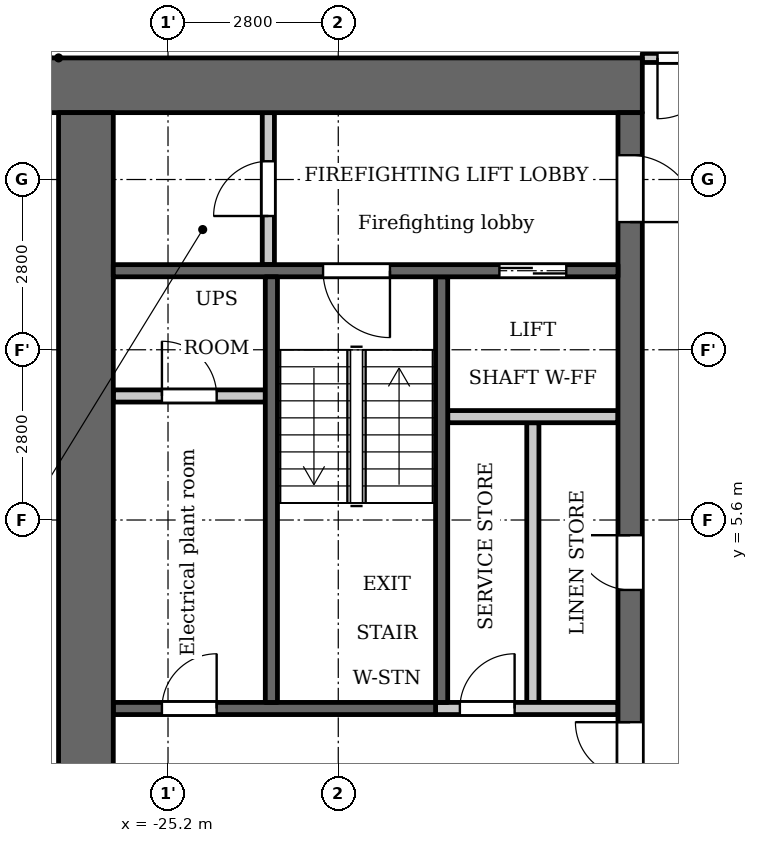
"""IFC4 building model, lengths in metres.
Left out: names, types, materials, properties, quantities, classifications, styles, units other than length and angle.
Written with IfcOpenShell. Run it as: python <this file> out.ifc"""

import sys

from ifc_helpers import new_model, si_unit, direction, frame, frame_2d, origin, place, context, subcontext, project, spatial, rectangle, extrude, element, fill, save


model = new_model("IFC4")
c1 = context("Model", 3, precision=1e-05, world=origin(), true_north=direction((0.0, 1.0)))
c2 = subcontext(c1, "Body", "Model", "MODEL_VIEW")
j1 = project(units=[si_unit("LENGTHUNIT", "METRE"), si_unit("PLANEANGLEUNIT", "RADIAN")], contexts=[c1])
p1 = place(None, origin())
s1 = spatial("IfcSite", under=j1, at=p1, CompositionType="ELEMENT")
p2 = place(p1, origin())
s2 = spatial("IfcBuilding", under=s1, at=p2, CompositionType="ELEMENT")
p3 = place(p2, frame((0.0, 0.0, 104.3)))
s3 = spatial("IfcBuildingStorey", under=s2, at=p3, CompositionType="ELEMENT", Elevation=104.3)
p4 = place(p3, frame((-20.7, 2.6, 0.0), z_axis=(0.0, 0.0, 1.0), x_axis=(0.0, 1.0, 0.0)))
e1 = element("IfcWall", 1, at=p4, inside=s3, PredefinedType="SHEAR", context=c2, shape_type="SweptSolid", body=[
    extrude(rectangle(XDim=7.0, YDim=0.2, at=frame_2d((3.5, 0.0))), origin(), (0.0, 0.0, 1.0), 3.2),
])
p5 = place(p3, frame((-20.8, 2.5, 0.0), z_axis=(0.0, 0.0, 1.0), x_axis=(-1.0, 0.0, 0.0)))
e2 = element("IfcWall", 2, at=p5, inside=s3, PredefinedType="SHEAR", context=c2, shape_type="SweptSolid", body=[
    extrude(rectangle(XDim=5.3, YDim=0.2, at=frame_2d((2.65, 0.0))), origin(), (0.0, 0.0, 1.0), 3.2),
])
p6 = place(p5, frame((3.6, 0.0, 0.0)))
e3 = element("IfcOpeningElement", 3, at=p6, cuts=e2, PredefinedType="OPENING", context=c2, shape_type="SweptSolid", body=[
    extrude(rectangle(XDim=0.9, YDim=2.1, at=frame_2d((0.45, 1.05))), frame((0.0, 0.11, 0.0), z_axis=(0.0, -1.0, 0.0), x_axis=(1.0, 0.0, 0.0)), (0.0, 0.0, 1.0), 0.22),
])
p7 = place(p3, frame((-17.4, 12.75, 0.0), z_axis=(0.0, 0.0, 1.0), x_axis=(-1.0, 0.0, 0.0)))
e4 = element("IfcWall", 4, at=p7, inside=s3, PredefinedType="SHEAR", context=c2, shape_type="SweptSolid", body=[
    extrude(rectangle(XDim=10.4, YDim=0.9, at=frame_2d((5.2, 0.0))), origin(), (0.0, 0.0, 1.0), 3.2),
])
p8 = place(p3, frame((-19.2, 2.6, 0.0), z_axis=(0.0, 0.0, 1.0), x_axis=(0.0, 1.0, 0.0)))
e5 = element("IfcWall", 5, at=p8, inside=s3, PredefinedType="PARTITIONING", context=c2, shape_type="SweptSolid", body=[
    extrude(rectangle(XDim=4.6, YDim=0.2, at=frame_2d((2.3, 0.0))), origin(), (0.0, 0.0, 1.0), 3.2),
])
p9 = place(p3, frame((-17.6, -12.3, 0.0), z_axis=(0.0, 0.0, 1.0), x_axis=(0.0, 1.0, 0.0)))
e6 = element("IfcWall", 6, at=p9, inside=s3, PredefinedType="SHEAR", context=c2, shape_type="SweptSolid", body=[
    extrude(rectangle(XDim=24.6, YDim=0.4, at=frame_2d((12.3, 0.0))), origin(), (0.0, 0.0, 1.0), 3.2),
])
p10 = place(p9, frame((6.0, 0.0, 0.0)))
e7 = element("IfcOpeningElement", 7, at=p10, cuts=e6, PredefinedType="OPENING", context=c2, shape_type="SweptSolid", body=[
    extrude(rectangle(XDim=1.1, YDim=2.1, at=frame_2d((0.55, 1.05))), frame((0.0, 0.21, 0.0), z_axis=(0.0, -1.0, 0.0), x_axis=(1.0, 0.0, 0.0)), (0.0, 0.0, 1.0), 0.42),
])
p11 = place(p9, frame((8.4, 0.0, 0.0)))
e8 = element("IfcOpeningElement", 8, at=p11, cuts=e6, PredefinedType="OPENING", context=c2, shape_type="SweptSolid", body=[
    extrude(rectangle(XDim=1.1, YDim=2.1, at=frame_2d((0.55, 1.05))), frame((0.0, 0.21, 0.0), z_axis=(0.0, -1.0, 0.0), x_axis=(1.0, 0.0, 0.0)), (0.0, 0.0, 1.0), 0.42),
])
p12 = place(p9, frame((10.8, 0.0, 0.0)))
e9 = element("IfcOpeningElement", 9, at=p12, cuts=e6, PredefinedType="OPENING", context=c2, shape_type="SweptSolid", body=[
    extrude(rectangle(XDim=1.1, YDim=2.1, at=frame_2d((0.55, 1.05))), frame((0.0, 0.21, 0.0), z_axis=(0.0, -1.0, 0.0), x_axis=(1.0, 0.0, 0.0)), (0.0, 0.0, 1.0), 0.42),
])
p13 = place(p9, frame((16.75, 0.0, 0.0)))
e10 = element("IfcOpeningElement", 10, at=p13, cuts=e6, PredefinedType="OPENING", context=c2, shape_type="SweptSolid", body=[
    extrude(rectangle(XDim=0.9, YDim=2.1, at=frame_2d((0.45, 1.05))), frame((0.0, 0.21, 0.0), z_axis=(0.0, -1.0, 0.0), x_axis=(1.0, 0.0, 0.0)), (0.0, 0.0, 1.0), 0.42),
])
p14 = place(p9, frame((22.8, 0.0, 0.0)))
e11 = element("IfcOpeningElement", 11, at=p14, cuts=e6, PredefinedType="OPENING", context=c2, shape_type="SweptSolid", body=[
    extrude(rectangle(XDim=1.1, YDim=2.1, at=frame_2d((0.55, 1.05))), frame((0.0, 0.21, 0.0), z_axis=(0.0, -1.0, 0.0), x_axis=(1.0, 0.0, 0.0)), (0.0, 0.0, 1.0), 0.42),
])
p15 = place(p9, frame((0.7, 0.0, 0.0)))
e12 = element("IfcOpeningElement", 12, at=p15, cuts=e6, PredefinedType="OPENING", context=c2, shape_type="SweptSolid", body=[
    extrude(rectangle(XDim=1.1, YDim=2.1, at=frame_2d((0.55, 1.05))), frame((0.0, 0.21, 0.0), z_axis=(0.0, -1.0, 0.0), x_axis=(1.0, 0.0, 0.0)), (0.0, 0.0, 1.0), 0.42),
])
p16 = place(p9, frame((12.775, 0.0, 0.0)))
e13 = element("IfcOpeningElement", 13, at=p16, cuts=e6, PredefinedType="OPENING", context=c2, shape_type="SweptSolid", body=[
    extrude(rectangle(XDim=1.8, YDim=2.1, at=frame_2d((0.9, 1.05))), frame((0.0, 0.21, 0.0), z_axis=(0.0, -1.0, 0.0), x_axis=(1.0, 0.0, 0.0)), (0.0, 0.0, 1.0), 0.42),
])
p17 = place(p3, frame((-26.55, -12.3, 0.0), z_axis=(0.0, 0.0, 1.0), x_axis=(0.0, 1.0, 0.0)))
e14 = element("IfcWall", 14, at=p17, inside=s3, PredefinedType="SHEAR", context=c2, shape_type="SweptSolid", body=[
    extrude(rectangle(XDim=24.6, YDim=0.9, at=frame_2d((12.3, 0.0))), origin(), (0.0, 0.0, 1.0), 3.2),
])
p18 = place(p3, frame((-23.55, 9.8, 0.0), z_axis=(0.0, 0.0, 1.0), x_axis=(0.0, 1.0, 0.0)))
e15 = element("IfcWall", 15, at=p18, inside=s3, PredefinedType="PARTITIONING", context=c2, shape_type="SweptSolid", body=[
    extrude(rectangle(XDim=2.5, YDim=0.2, at=frame_2d((1.25, 0.0))), origin(), (0.0, 0.0, 1.0), 3.2),
])
p19 = place(p18, frame((0.8, 0.0, 0.0)))
e16 = element("IfcOpeningElement", 16, at=p19, cuts=e15, PredefinedType="OPENING", context=c2, shape_type="SweptSolid", body=[
    extrude(rectangle(XDim=0.9, YDim=2.1, at=frame_2d((0.45, 1.05))), frame((0.0, 0.11, 0.0), z_axis=(0.0, -1.0, 0.0), x_axis=(1.0, 0.0, 0.0)), (0.0, 0.0, 1.0), 0.22),
])
p20 = place(p3, frame((-23.6, 7.64, 0.0), z_axis=(0.0, 0.0, 1.0), x_axis=(-1.0, 0.0, 0.0)))
e17 = element("IfcWall", 17, at=p20, inside=s3, PredefinedType="PARTITIONING", context=c2, shape_type="SweptSolid", body=[
    extrude(rectangle(XDim=2.5, YDim=0.2, at=frame_2d((1.25, 0.0))), origin(), (0.0, 0.0, 1.0), 3.2),
])
p21 = place(p20, frame((0.8, 0.0, 0.0)))
e18 = element("IfcOpeningElement", 18, at=p21, cuts=e17, PredefinedType="OPENING", context=c2, shape_type="SweptSolid", body=[
    extrude(rectangle(XDim=0.9, YDim=2.1, at=frame_2d((0.45, 1.05))), frame((0.0, 0.11, 0.0), z_axis=(0.0, -1.0, 0.0), x_axis=(1.0, 0.0, 0.0)), (0.0, 0.0, 1.0), 0.22),
])
p22 = place(p3, frame((-17.8, 2.5, 0.0), z_axis=(0.0, 0.0, 1.0), x_axis=(-1.0, 0.0, 0.0)))
e19 = element("IfcWall", 19, at=p22, inside=s3, PredefinedType="PARTITIONING", context=c2, shape_type="SweptSolid", body=[
    extrude(rectangle(XDim=3.0, YDim=0.2, at=frame_2d((1.5, 0.0))), origin(), (0.0, 0.0, 1.0), 3.2),
])
p23 = place(p22, frame((1.7, 0.0, 0.0)))
e20 = element("IfcOpeningElement", 20, at=p23, cuts=e19, PredefinedType="OPENING", context=c2, shape_type="SweptSolid", body=[
    extrude(rectangle(XDim=0.9, YDim=2.1, at=frame_2d((0.45, 1.05))), frame((0.0, 0.11, 0.0), z_axis=(0.0, -1.0, 0.0), x_axis=(1.0, 0.0, 0.0)), (0.0, 0.0, 1.0), 0.22),
])
p24 = place(p3, frame((-17.8, 7.3, 0.0), z_axis=(0.0, 0.0, 1.0), x_axis=(-1.0, 0.0, 0.0)))
e21 = element("IfcWall", 21, at=p24, inside=s3, PredefinedType="PARTITIONING", context=c2, shape_type="SweptSolid", body=[
    extrude(rectangle(XDim=2.8, YDim=0.2, at=frame_2d((1.4, 0.0))), origin(), (0.0, 0.0, 1.0), 3.2),
])
p25 = place(p3, frame((-17.8, 9.7, 0.0), z_axis=(0.0, 0.0, 1.0), x_axis=(-1.0, 0.0, 0.0)))
e22 = element("IfcWall", 22, at=p25, inside=s3, PredefinedType="SHEAR", context=c2, shape_type="SweptSolid", body=[
    extrude(rectangle(XDim=8.3, YDim=0.2, at=frame_2d((4.15, 0.0))), origin(), (0.0, 0.0, 1.0), 3.2),
])
p26 = place(p25, frame((0.85, 0.0, 0.0)))
e23 = element("IfcOpeningElement", 23, at=p26, cuts=e22, PredefinedType="OPENING", context=c2, shape_type="SweptSolid", body=[
    extrude(rectangle(XDim=1.1, YDim=2.1, at=frame_2d((0.55, 1.05))), frame((0.0, 0.11, 0.0), z_axis=(0.0, -1.0, 0.0), x_axis=(1.0, 0.0, 0.0)), (0.0, 0.0, 1.0), 0.22),
])
p27 = place(p25, frame((3.75, 0.0, 0.0)))
e24 = element("IfcOpeningElement", 24, at=p27, cuts=e22, PredefinedType="OPENING", context=c2, shape_type="SweptSolid", body=[
    extrude(rectangle(XDim=1.1, YDim=2.1, at=frame_2d((0.55, 1.05))), frame((0.0, 0.11, 0.0), z_axis=(0.0, -1.0, 0.0), x_axis=(1.0, 0.0, 0.0)), (0.0, 0.0, 1.0), 0.22),
])
p28 = place(p3, frame((-23.5, 2.6, 0.0), z_axis=(0.0, 0.0, 1.0), x_axis=(0.0, 1.0, 0.0)))
e25 = element("IfcWall", 25, at=p28, inside=s3, PredefinedType="SHEAR", context=c2, shape_type="SweptSolid", body=[
    extrude(rectangle(XDim=7.0, YDim=0.2, at=frame_2d((3.5, 0.0))), origin(), (0.0, 0.0, 1.0), 3.2),
])
p29 = place(p3, frame((-17.4, 13.2, 0.0), z_axis=(0.0, 0.0, 1.0), x_axis=(1.0, 0.0, 0.0)))
e26 = element("IfcWall", 26, at=p29, inside=s3, PredefinedType="PARTITIONING", context=c2, shape_type="SweptSolid", body=[
    extrude(rectangle(XDim=34.8, YDim=0.15, at=frame_2d((17.4, 0.0))), origin(), (0.0, 0.0, 1.0), 3.2),
])
p30 = place(p29, frame((0.25, 0.0, 0.0)))
e27 = element("IfcOpeningElement", 27, at=p30, cuts=e26, PredefinedType="OPENING", context=c2, shape_type="SweptSolid", body=[
    extrude(rectangle(XDim=1.0, YDim=2.1, at=frame_2d((0.5, 1.05))), frame((0.0, 0.085, 0.0), z_axis=(0.0, -1.0, 0.0), x_axis=(1.0, 0.0, 0.0)), (0.0, 0.0, 1.0), 0.17),
])
p31 = place(p29, frame((33.65, 0.0, 0.0)))
e28 = element("IfcOpeningElement", 28, at=p31, cuts=e26, PredefinedType="OPENING", context=c2, shape_type="SweptSolid", body=[
    extrude(rectangle(XDim=1.0, YDim=2.1, at=frame_2d((0.5, 1.05))), frame((0.0, 0.085, 0.0), z_axis=(0.0, -1.0, 0.0), x_axis=(1.0, 0.0, 0.0)), (0.0, 0.0, 1.0), 0.17),
])
p32 = place(p29, frame((4.55, 0.0, 0.0)))
e29 = element("IfcOpeningElement", 29, at=p32, cuts=e26, PredefinedType="OPENING", context=c2, shape_type="SweptSolid", body=[
    extrude(rectangle(XDim=1.0, YDim=2.1, at=frame_2d((0.5, 1.05))), frame((0.0, 0.085, 0.0), z_axis=(0.0, -1.0, 0.0), x_axis=(1.0, 0.0, 0.0)), (0.0, 0.0, 1.0), 0.17),
])
p33 = place(p29, frame((6.85, 0.0, 0.0)))
e30 = element("IfcOpeningElement", 30, at=p33, cuts=e26, PredefinedType="OPENING", context=c2, shape_type="SweptSolid", body=[
    extrude(rectangle(XDim=1.0, YDim=2.1, at=frame_2d((0.5, 1.05))), frame((0.0, 0.085, 0.0), z_axis=(0.0, -1.0, 0.0), x_axis=(1.0, 0.0, 0.0)), (0.0, 0.0, 1.0), 0.17),
])
p34 = place(p29, frame((12.5, 0.0, 0.0)))
e31 = element("IfcOpeningElement", 31, at=p34, cuts=e26, PredefinedType="OPENING", context=c2, shape_type="SweptSolid", body=[
    extrude(rectangle(XDim=1.0, YDim=2.1, at=frame_2d((0.5, 1.05))), frame((0.0, 0.085, 0.0), z_axis=(0.0, -1.0, 0.0), x_axis=(1.0, 0.0, 0.0)), (0.0, 0.0, 1.0), 0.17),
])
p35 = place(p29, frame((25.7, 0.0, 0.0)))
e32 = element("IfcOpeningElement", 32, at=p35, cuts=e26, PredefinedType="OPENING", context=c2, shape_type="SweptSolid", body=[
    extrude(rectangle(XDim=1.0, YDim=2.1, at=frame_2d((0.5, 1.05))), frame((0.0, 0.085, 0.0), z_axis=(0.0, -1.0, 0.0), x_axis=(1.0, 0.0, 0.0)), (0.0, 0.0, 1.0), 0.17),
])
p36 = place(p29, frame((29.75, 0.0, 0.0)))
e33 = element("IfcOpeningElement", 33, at=p36, cuts=e26, PredefinedType="OPENING", context=c2, shape_type="SweptSolid", body=[
    extrude(rectangle(XDim=1.0, YDim=2.1, at=frame_2d((0.5, 1.05))), frame((0.0, 0.085, 0.0), z_axis=(0.0, -1.0, 0.0), x_axis=(1.0, 0.0, 0.0)), (0.0, 0.0, 1.0), 0.17),
])
p37 = place(p13, origin())
e34 = element("IfcDoor", 34, at=p37, inside=s3, OperationType="SINGLE_SWING_LEFT", PredefinedType="DOOR", context=c2, shape_type="SweptSolid", body=[
    extrude(rectangle(XDim=0.9, YDim=2.1, at=frame_2d((0.45, 1.05))), frame((0.0, 0.025, 0.0), z_axis=(0.0, -1.0, 0.0), x_axis=(1.0, 0.0, 0.0)), (0.0, 0.0, 1.0), 0.05),
])
fill(e10, e34)
p38 = place(p23, origin())
e35 = element("IfcDoor", 35, at=p38, inside=s3, OperationType="SINGLE_SWING_LEFT", PredefinedType="DOOR", context=c2, shape_type="SweptSolid", body=[
    extrude(rectangle(XDim=0.9, YDim=2.1, at=frame_2d((0.45, 1.05))), frame((0.0, 0.025, 0.0), z_axis=(0.0, -1.0, 0.0), x_axis=(1.0, 0.0, 0.0)), (0.0, 0.0, 1.0), 0.05),
])
fill(e20, e35)
p39 = place(p26, origin())
e36 = element("IfcDoor", 36, at=p39, inside=s3, OperationType="DOUBLE_DOOR_SLIDING", PredefinedType="DOOR", context=c2, shape_type="SweptSolid", body=[
    extrude(rectangle(XDim=1.1, YDim=2.1, at=frame_2d((0.55, 1.05))), frame((0.0, 0.025, 0.0), z_axis=(0.0, -1.0, 0.0), x_axis=(1.0, 0.0, 0.0)), (0.0, 0.0, 1.0), 0.05),
])
fill(e23, e36)
p40 = place(p14, origin())
e37 = element("IfcDoor", 37, at=p40, inside=s3, OperationType="SINGLE_SWING_LEFT", PredefinedType="DOOR", context=c2, shape_type="SweptSolid", body=[
    extrude(rectangle(XDim=1.1, YDim=2.1, at=frame_2d((0.55, 1.05))), frame((0.0, 0.025, 0.0), z_axis=(0.0, -1.0, 0.0), x_axis=(1.0, 0.0, 0.0)), (0.0, 0.0, 1.0), 0.05),
])
fill(e11, e37)
p41 = place(p19, origin())
e38 = element("IfcDoor", 38, at=p41, inside=s3, OperationType="SINGLE_SWING_RIGHT", PredefinedType="DOOR", context=c2, shape_type="SweptSolid", body=[
    extrude(rectangle(XDim=0.9, YDim=2.1, at=frame_2d((0.45, 1.05))), frame((0.0, 0.025, 0.0), z_axis=(0.0, -1.0, 0.0), x_axis=(1.0, 0.0, 0.0)), (0.0, 0.0, 1.0), 0.05),
])
fill(e16, e38)
p42 = place(p27, origin())
e39 = element("IfcDoor", 39, at=p42, inside=s3, OperationType="SINGLE_SWING_RIGHT", PredefinedType="DOOR", context=c2, shape_type="SweptSolid", body=[
    extrude(rectangle(XDim=1.1, YDim=2.1, at=frame_2d((0.55, 1.05))), frame((0.0, 0.025, 0.0), z_axis=(0.0, -1.0, 0.0), x_axis=(1.0, 0.0, 0.0)), (0.0, 0.0, 1.0), 0.05),
])
fill(e24, e39)
p43 = place(p16, origin())
e40 = element("IfcDoor", 40, at=p43, inside=s3, OperationType="DOUBLE_DOOR_SINGLE_SWING", PredefinedType="DOOR", context=c2, shape_type="SweptSolid", body=[
    extrude(rectangle(XDim=1.8, YDim=2.1, at=frame_2d((0.9, 1.05))), frame((0.0, 0.025, 0.0), z_axis=(0.0, -1.0, 0.0), x_axis=(1.0, 0.0, 0.0)), (0.0, 0.0, 1.0), 0.05),
])
fill(e13, e40)
p44 = place(p21, origin())
e41 = element("IfcDoor", 41, at=p44, inside=s3, OperationType="SINGLE_SWING_RIGHT", PredefinedType="DOOR", context=c2, shape_type="SweptSolid", body=[
    extrude(rectangle(XDim=0.9, YDim=2.1, at=frame_2d((0.45, 1.05))), frame((0.0, 0.025, 0.0), z_axis=(0.0, -1.0, 0.0), x_axis=(1.0, 0.0, 0.0)), (0.0, 0.0, 1.0), 0.05),
])
fill(e18, e41)
p45 = place(p6, origin())
e42 = element("IfcDoor", 42, at=p45, inside=s3, OperationType="SINGLE_SWING_LEFT", PredefinedType="DOOR", context=c2, shape_type="SweptSolid", body=[
    extrude(rectangle(XDim=0.9, YDim=2.1, at=frame_2d((0.45, 1.05))), frame((0.0, 0.025, 0.0), z_axis=(0.0, -1.0, 0.0), x_axis=(1.0, 0.0, 0.0)), (0.0, 0.0, 1.0), 0.05),
])
fill(e3, e42)
p46 = place(p30, origin())
e43 = element("IfcDoor", 43, at=p46, inside=s3, OperationType="SINGLE_SWING_LEFT", PredefinedType="DOOR", context=c2, shape_type="SweptSolid", body=[
    extrude(rectangle(XDim=1.0, YDim=2.1, at=frame_2d((0.5, 1.05))), frame((0.0, 0.025, 0.0), z_axis=(0.0, -1.0, 0.0), x_axis=(1.0, 0.0, 0.0)), (0.0, 0.0, 1.0), 0.05),
])
fill(e27, e43)
save(model, sys.argv[1])
